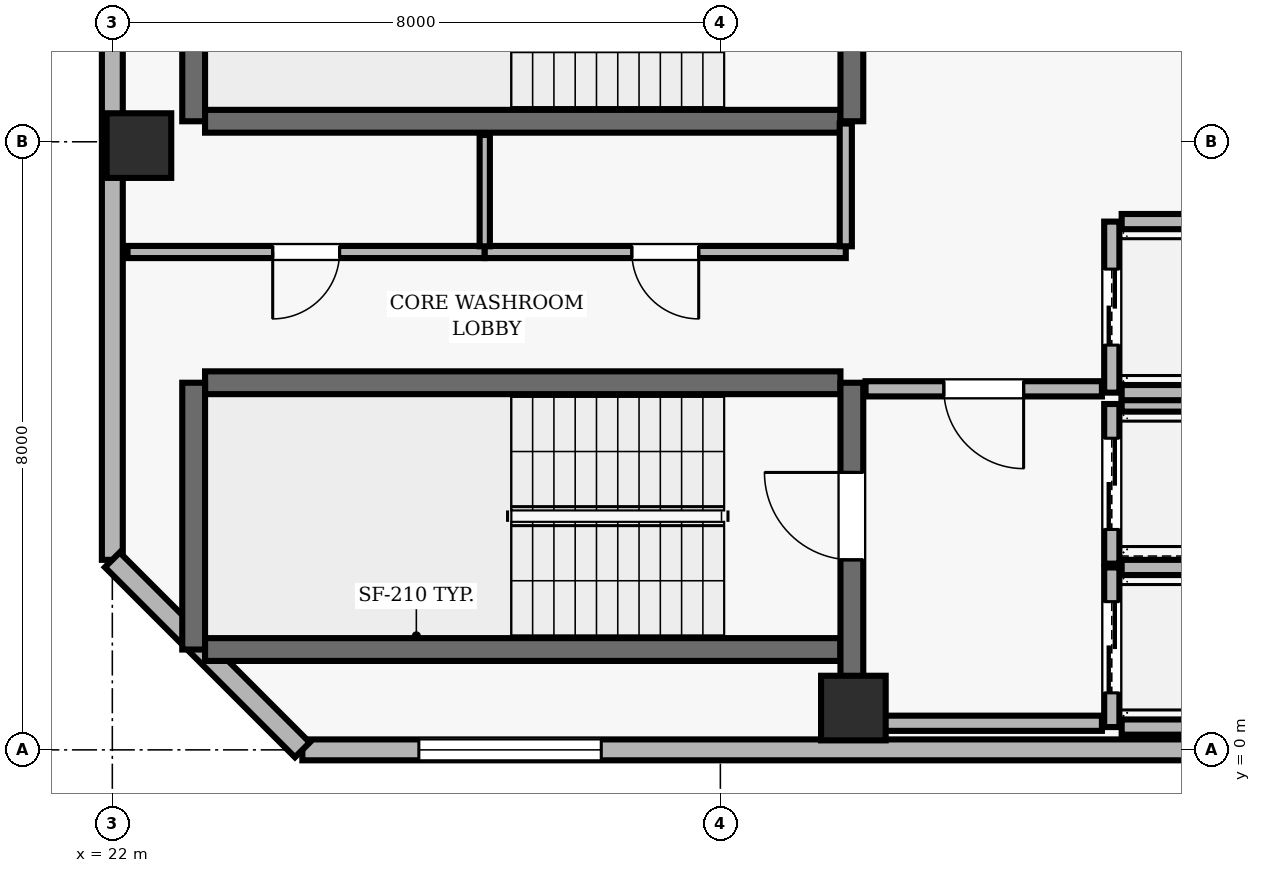
"""IFC4 building model, lengths in metres.
Left out: names, types, materials, properties, quantities, classifications, styles, units other than length and angle.
Written with IfcOpenShell. Run it as: python <this file> out.ifc"""

import sys

from ifc_helpers import new_model, si_unit, direction, frame, frame_2d, origin, origin_2d, place, context, subcontext, project, spatial, rectangle, extrude, element, fill, save


model = new_model("IFC4")
c1 = context("Model", 3, precision=1e-05, world=origin(), true_north=direction((0.0, 1.0)))
c2 = subcontext(c1, "Body", "Model", "MODEL_VIEW")
j1 = project(units=[si_unit("LENGTHUNIT", "METRE"), si_unit("PLANEANGLEUNIT", "RADIAN")], contexts=[c1])
p1 = place(None, origin())
s1 = spatial("IfcSite", under=j1, at=p1, CompositionType="ELEMENT")
p2 = place(p1, origin())
s2 = spatial("IfcBuilding", under=s1, at=p2, CompositionType="ELEMENT")
p3 = place(p2, frame((0.0, 0.0, 263.8)))
s3 = spatial("IfcBuildingStorey", under=s2, at=p3, CompositionType="ELEMENT", Elevation=263.8)
for number, where, z_axis, x_axis in (
    (1, (31.75, 0.55, 0.0), (0.0, 0.0, 1.0), (1.0, 0.0, 0.0)),
    (2, (22.35, 7.95, 0.0), (0.0, 0.0, 1.0), (1.0, 0.0, 0.0)),
):
    element("IfcColumn", number, at=place(p3, frame(where, z_axis=z_axis, x_axis=x_axis)), inside=s3, PredefinedType="COLUMN", context=c2, shape_type="SweptSolid", body=[
        extrude(rectangle(XDim=0.85, YDim=0.85, at=origin_2d()), origin(), (0.0, 0.0, 1.0), 3.9),
    ])
p4 = place(p3, frame((24.5, 0.0, 0.0), z_axis=(0.0, 0.0, 1.0), x_axis=(1.0, 0.0, 0.0)))
e3 = element("IfcWall", 3, at=p4, inside=s3, PredefinedType="SOLIDWALL", context=c2, shape_type="SweptSolid", body=[
    extrude(rectangle(XDim=32.8, YDim=0.275, at=frame_2d((16.4, 0.0))), origin(), (0.0, 0.0, 1.0), 3.69),
])
p5 = place(p4, frame((1.533, 0.0, 0.9)))
e4 = element("IfcOpeningElement", 4, at=p5, cuts=e3, PredefinedType="OPENING", context=c2, shape_type="SweptSolid", body=[
    extrude(rectangle(XDim=2.4, YDim=1.6, at=frame_2d((1.2, 0.8))), frame((0.0, 0.147, 0.0), z_axis=(0.0, -1.0, 0.0), x_axis=(1.0, 0.0, 0.0)), (0.0, 0.0, 1.0), 0.295),
])
p6 = place(p4, frame((23.4, 0.0, 0.9)))
e5 = element("IfcOpeningElement", 5, at=p6, cuts=e3, PredefinedType="OPENING", context=c2, shape_type="SweptSolid", body=[
    extrude(rectangle(XDim=2.4, YDim=1.6, at=frame_2d((1.2, 0.8))), frame((0.0, 0.147, 0.0), z_axis=(0.0, -1.0, 0.0), x_axis=(1.0, 0.0, 0.0)), (0.0, 0.0, 1.0), 0.295),
])
p7 = place(p4, frame((28.867, 0.0, 0.9)))
e6 = element("IfcOpeningElement", 6, at=p7, cuts=e3, PredefinedType="OPENING", context=c2, shape_type="SweptSolid", body=[
    extrude(rectangle(XDim=2.4, YDim=1.6, at=frame_2d((1.2, 0.8))), frame((0.0, 0.147, 0.0), z_axis=(0.0, -1.0, 0.0), x_axis=(1.0, 0.0, 0.0)), (0.0, 0.0, 1.0), 0.295),
])
p8 = place(p3, frame((22.0, 35.3, 0.0), z_axis=(0.0, 0.0, 1.0), x_axis=(0.0, -1.0, 0.0)))
e7 = element("IfcWall", 7, at=p8, inside=s3, PredefinedType="SOLIDWALL", context=c2, shape_type="SweptSolid", body=[
    extrude(rectangle(XDim=32.8, YDim=0.275, at=frame_2d((16.4, 0.0))), origin(), (0.0, 0.0, 1.0), 3.69),
])
p9 = place(p8, frame((7.3, 0.0, 0.0)))
e8 = element("IfcOpeningElement", 8, at=p9, cuts=e7, PredefinedType="OPENING", context=c2, shape_type="SweptSolid", body=[
    extrude(rectangle(XDim=1.0, YDim=2.2, at=frame_2d((0.5, 1.1))), frame((0.0, 0.147, 0.0), z_axis=(0.0, -1.0, 0.0), x_axis=(1.0, 0.0, 0.0)), (0.0, 0.0, 1.0), 0.295),
])
p10 = place(p8, frame((12.917, 0.0, 0.9)))
e9 = element("IfcOpeningElement", 9, at=p10, cuts=e7, PredefinedType="OPENING", context=c2, shape_type="SweptSolid", body=[
    extrude(rectangle(XDim=2.4, YDim=1.6, at=frame_2d((1.2, 0.8))), frame((0.0, 0.147, 0.0), z_axis=(0.0, -1.0, 0.0), x_axis=(1.0, 0.0, 0.0)), (0.0, 0.0, 1.0), 0.295),
])
p11 = place(p8, frame((17.483, 0.0, 0.9)))
e10 = element("IfcOpeningElement", 10, at=p11, cuts=e7, PredefinedType="OPENING", context=c2, shape_type="SweptSolid", body=[
    extrude(rectangle(XDim=2.4, YDim=1.6, at=frame_2d((1.2, 0.8))), frame((0.0, 0.147, 0.0), z_axis=(0.0, -1.0, 0.0), x_axis=(1.0, 0.0, 0.0)), (0.0, 0.0, 1.0), 0.295),
])
p12 = place(p8, frame((23.4, 0.0, 0.9)))
e11 = element("IfcOpeningElement", 11, at=p12, cuts=e7, PredefinedType="OPENING", context=c2, shape_type="SweptSolid", body=[
    extrude(rectangle(XDim=2.4, YDim=1.6, at=frame_2d((1.2, 0.8))), frame((0.0, 0.147, 0.0), z_axis=(0.0, -1.0, 0.0), x_axis=(1.0, 0.0, 0.0)), (0.0, 0.0, 1.0), 0.295),
])
p13 = place(p3, frame((22.0, 2.5, 0.0), z_axis=(0.0, 0.0, 1.0), x_axis=(0.707106781187, -0.707106781187, 0.0)))
e12 = element("IfcWall", 12, at=p13, inside=s3, PredefinedType="SOLIDWALL", context=c2, shape_type="SweptSolid", body=[
    extrude(rectangle(XDim=3.536, YDim=0.275, at=frame_2d((1.768, 0.0))), origin(), (0.0, 0.0, 1.0), 3.69),
])
p14 = place(p3, frame((31.58, 4.83, 0.0), z_axis=(0.0, 0.0, 1.0), x_axis=(-1.0, 0.0, 0.0)))
e13 = element("IfcWall", 13, at=p14, inside=s3, PredefinedType="SHEAR", context=c2, shape_type="SweptSolid", body=[
    extrude(rectangle(XDim=8.36, YDim=0.3, at=frame_2d((4.18, 0.0))), origin(), (0.0, 0.0, 1.0), 3.69),
])
p15 = place(p3, frame((23.07, 4.83, 0.0), z_axis=(0.0, 0.0, 1.0), x_axis=(0.0, -1.0, 0.0)))
e14 = element("IfcWall", 14, at=p15, inside=s3, PredefinedType="SHEAR", context=c2, shape_type="SweptSolid", body=[
    extrude(rectangle(XDim=3.51, YDim=0.3, at=frame_2d((1.755, 0.0))), origin(), (0.0, 0.0, 1.0), 3.69),
])
p16 = place(p3, frame((23.22, 1.32, 0.0), z_axis=(0.0, 0.0, 1.0), x_axis=(1.0, 0.0, 0.0)))
e15 = element("IfcWall", 15, at=p16, inside=s3, PredefinedType="SHEAR", context=c2, shape_type="SweptSolid", body=[
    extrude(rectangle(XDim=8.36, YDim=0.3, at=frame_2d((4.18, 0.0))), origin(), (0.0, 0.0, 1.0), 3.69),
])
p17 = place(p3, frame((31.73, 0.96, 0.0), z_axis=(0.0, 0.0, 1.0), x_axis=(0.0, 1.0, 0.0)))
e16 = element("IfcWall", 16, at=p17, inside=s3, PredefinedType="SHEAR", context=c2, shape_type="SweptSolid", body=[
    extrude(rectangle(XDim=3.87, YDim=0.3, at=frame_2d((1.935, 0.0))), origin(), (0.0, 0.0, 1.0), 3.69),
])
p18 = place(p17, frame((1.54, 0.0, 0.0)))
e17 = element("IfcOpeningElement", 17, at=p18, cuts=e16, PredefinedType="OPENING", context=c2, shape_type="SweptSolid", body=[
    extrude(rectangle(XDim=1.15, YDim=2.15, at=frame_2d((0.575, 1.075))), frame((0.0, 0.16, 0.0), z_axis=(0.0, -1.0, 0.0), x_axis=(1.0, 0.0, 0.0)), (0.0, 0.0, 1.0), 0.32),
])
p19 = place(p3, frame((23.07, 11.78, 0.0), z_axis=(0.0, 0.0, 1.0), x_axis=(0.0, -1.0, 0.0)))
e18 = element("IfcWall", 18, at=p19, inside=s3, PredefinedType="SHEAR", context=c2, shape_type="SweptSolid", body=[
    extrude(rectangle(XDim=3.51, YDim=0.3, at=frame_2d((1.755, 0.0))), origin(), (0.0, 0.0, 1.0), 3.69),
])
p20 = place(p3, frame((23.22, 8.27, 0.0), z_axis=(0.0, 0.0, 1.0), x_axis=(1.0, 0.0, 0.0)))
e19 = element("IfcWall", 19, at=p20, inside=s3, PredefinedType="SHEAR", context=c2, shape_type="SweptSolid", body=[
    extrude(rectangle(XDim=8.36, YDim=0.3, at=frame_2d((4.18, 0.0))), origin(), (0.0, 0.0, 1.0), 3.69),
])
p21 = place(p3, frame((31.73, 8.27, 0.0), z_axis=(0.0, 0.0, 1.0), x_axis=(0.0, 1.0, 0.0)))
e20 = element("IfcWall", 20, at=p21, inside=s3, PredefinedType="SHEAR", context=c2, shape_type="SweptSolid", body=[
    extrude(rectangle(XDim=3.51, YDim=0.3, at=frame_2d((1.755, 0.0))), origin(), (0.0, 0.0, 1.0), 3.69),
])
p22 = place(p21, frame((1.18, 0.0, 0.0)))
e21 = element("IfcOpeningElement", 21, at=p22, cuts=e20, PredefinedType="OPENING", context=c2, shape_type="SweptSolid", body=[
    extrude(rectangle(XDim=1.15, YDim=2.15, at=frame_2d((0.575, 1.075))), frame((0.0, 0.16, 0.0), z_axis=(0.0, -1.0, 0.0), x_axis=(1.0, 0.0, 0.0)), (0.0, 0.0, 1.0), 0.32),
])
p23 = place(p3, frame((35.15, 2.4, 0.0), z_axis=(0.0, 0.0, 1.0), x_axis=(0.0, -1.0, 0.0)))
e22 = element("IfcWall", 22, at=p23, inside=s3, PredefinedType="SOLIDWALL", context=c2, shape_type="SweptSolid", body=[
    extrude(rectangle(XDim=2.1, YDim=0.2, at=frame_2d((1.05, 0.0))), origin(), (0.0, 0.0, 1.0), 3.69),
])
p24 = place(p23, frame((0.45, 0.0, 0.0)))
e23 = element("IfcOpeningElement", 23, at=p24, cuts=e22, PredefinedType="OPENING", context=c2, shape_type="SweptSolid", body=[
    extrude(rectangle(XDim=1.2, YDim=2.15, at=frame_2d((0.6, 1.075))), frame((0.0, 0.11, 0.0), z_axis=(0.0, -1.0, 0.0), x_axis=(1.0, 0.0, 0.0)), (0.0, 0.0, 1.0), 0.22),
])
for number, where, z_axis, x_axis in (
    (24, (35.28, 0.3, 0.0), (0.0, 0.0, 1.0), (1.0, 0.0, 0.0)),
    (25, (37.42, 2.4, 0.0), (0.0, 0.0, 1.0), (-1.0, 0.0, 0.0)),
):
    element("IfcWall", number, at=place(p3, frame(where, z_axis=z_axis, x_axis=x_axis)), inside=s3, PredefinedType="SOLIDWALL", context=c2, shape_type="SweptSolid", body=[
        extrude(rectangle(XDim=2.14, YDim=0.2, at=frame_2d((1.07, 0.0))), origin(), (0.0, 0.0, 1.0), 3.69),
    ])
p25 = place(p3, frame((35.15, 4.55, 0.0), z_axis=(0.0, 0.0, 1.0), x_axis=(0.0, -1.0, 0.0)))
e26 = element("IfcWall", 26, at=p25, inside=s3, PredefinedType="SOLIDWALL", context=c2, shape_type="SweptSolid", body=[
    extrude(rectangle(XDim=2.1, YDim=0.2, at=frame_2d((1.05, 0.0))), origin(), (0.0, 0.0, 1.0), 3.69),
])
p26 = place(p25, frame((0.45, 0.0, 0.0)))
e27 = element("IfcOpeningElement", 27, at=p26, cuts=e26, PredefinedType="OPENING", context=c2, shape_type="SweptSolid", body=[
    extrude(rectangle(XDim=1.2, YDim=2.15, at=frame_2d((0.6, 1.075))), frame((0.0, 0.11, 0.0), z_axis=(0.0, -1.0, 0.0), x_axis=(1.0, 0.0, 0.0)), (0.0, 0.0, 1.0), 0.22),
])
p27 = place(p3, frame((37.42, 4.55, 0.0), z_axis=(0.0, 0.0, 1.0), x_axis=(-1.0, 0.0, 0.0)))
e28 = element("IfcWall", 28, at=p27, inside=s3, PredefinedType="SOLIDWALL", context=c2, shape_type="SweptSolid", body=[
    extrude(rectangle(XDim=2.14, YDim=0.2, at=frame_2d((1.07, 0.0))), origin(), (0.0, 0.0, 1.0), 3.69),
])
p28 = place(p3, frame((35.15, 6.95, 0.0), z_axis=(0.0, 0.0, 1.0), x_axis=(0.0, -1.0, 0.0)))
e29 = element("IfcWall", 29, at=p28, inside=s3, PredefinedType="SOLIDWALL", context=c2, shape_type="SweptSolid", body=[
    extrude(rectangle(XDim=2.25, YDim=0.2, at=frame_2d((1.125, 0.0))), origin(), (0.0, 0.0, 1.0), 3.69),
])
p29 = place(p28, frame((0.625, 0.0, 0.0)))
e30 = element("IfcOpeningElement", 30, at=p29, cuts=e29, PredefinedType="OPENING", context=c2, shape_type="SweptSolid", body=[
    extrude(rectangle(XDim=1.0, YDim=2.1, at=frame_2d((0.5, 1.05))), frame((0.0, 0.11, 0.0), z_axis=(0.0, -1.0, 0.0), x_axis=(1.0, 0.0, 0.0)), (0.0, 0.0, 1.0), 0.22),
])
for number, where, z_axis, x_axis in (
    (31, (35.28, 4.7, 0.0), (0.0, 0.0, 1.0), (1.0, 0.0, 0.0)),
    (32, (37.42, 6.95, 0.0), (0.0, 0.0, 1.0), (-1.0, 0.0, 0.0)),
):
    element("IfcWall", number, at=place(p3, frame(where, z_axis=z_axis, x_axis=x_axis)), inside=s3, PredefinedType="SOLIDWALL", context=c2, shape_type="SweptSolid", body=[
        extrude(rectangle(XDim=2.14, YDim=0.2, at=frame_2d((1.07, 0.0))), origin(), (0.0, 0.0, 1.0), 3.69),
    ])
p30 = place(p3, frame((26.9, 6.55, 0.0), z_axis=(0.0, 0.0, 1.0), x_axis=(-1.0, 0.0, 0.0)))
e33 = element("IfcWall", 33, at=p30, inside=s3, PredefinedType="PARTITIONING", context=c2, shape_type="SweptSolid", body=[
    extrude(rectangle(XDim=4.7, YDim=0.16, at=frame_2d((2.35, 0.0))), origin(), (0.0, 0.0, 1.0), 3.69),
])
p31 = place(p30, frame((1.91, 0.0, 0.0)))
e34 = element("IfcOpeningElement", 34, at=p31, cuts=e33, PredefinedType="OPENING", context=c2, shape_type="SweptSolid", body=[
    extrude(rectangle(XDim=0.88, YDim=2.1, at=frame_2d((0.44, 1.05))), frame((0.0, 0.09, 0.0), z_axis=(0.0, -1.0, 0.0), x_axis=(1.0, 0.0, 0.0)), (0.0, 0.0, 1.0), 0.18),
])
p32 = place(p3, frame((31.65, 0.35, 0.0), z_axis=(0.0, 0.0, 1.0), x_axis=(1.0, 0.0, 0.0)))
e35 = element("IfcWall", 35, at=p32, inside=s3, PredefinedType="SOLIDWALL", context=c2, shape_type="SweptSolid", body=[
    extrude(rectangle(XDim=3.37, YDim=0.2, at=frame_2d((1.685, 0.0))), origin(), (0.0, 0.0, 1.0), 3.69),
])
p33 = place(p3, frame((31.65, 6.55, 0.0), z_axis=(0.0, 0.0, 1.0), x_axis=(-1.0, 0.0, 0.0)))
e36 = element("IfcWall", 36, at=p33, inside=s3, PredefinedType="PARTITIONING", context=c2, shape_type="SweptSolid", body=[
    extrude(rectangle(XDim=4.75, YDim=0.16, at=frame_2d((2.375, 0.0))), origin(), (0.0, 0.0, 1.0), 3.69),
])
p34 = place(p33, frame((1.935, 0.0, 0.0)))
e37 = element("IfcOpeningElement", 37, at=p34, cuts=e36, PredefinedType="OPENING", context=c2, shape_type="SweptSolid", body=[
    extrude(rectangle(XDim=0.88, YDim=2.1, at=frame_2d((0.44, 1.05))), frame((0.0, 0.09, 0.0), z_axis=(0.0, -1.0, 0.0), x_axis=(1.0, 0.0, 0.0)), (0.0, 0.0, 1.0), 0.18),
])
p35 = place(p3, frame((35.02, 4.75, 0.0), z_axis=(0.0, 0.0, 1.0), x_axis=(-1.0, 0.0, 0.0)))
e38 = element("IfcWall", 38, at=p35, inside=s3, PredefinedType="SOLIDWALL", context=c2, shape_type="SweptSolid", body=[
    extrude(rectangle(XDim=3.11, YDim=0.2, at=frame_2d((1.555, 0.0))), origin(), (0.0, 0.0, 1.0), 3.69),
])
p36 = place(p35, frame((1.03, 0.0, 0.0)))
e39 = element("IfcOpeningElement", 39, at=p36, cuts=e38, PredefinedType="OPENING", context=c2, shape_type="SweptSolid", body=[
    extrude(rectangle(XDim=1.05, YDim=2.15, at=frame_2d((0.525, 1.075))), frame((0.0, 0.11, 0.0), z_axis=(0.0, -1.0, 0.0), x_axis=(1.0, 0.0, 0.0)), (0.0, 0.0, 1.0), 0.22),
])
p37 = place(p3, frame((26.9, 6.625, 0.0), z_axis=(0.0, 0.0, 1.0), x_axis=(0.0, 1.0, 0.0)))
e40 = element("IfcWall", 40, at=p37, inside=s3, PredefinedType="PARTITIONING", context=c2, shape_type="SweptSolid", body=[
    extrude(rectangle(XDim=1.465, YDim=0.135, at=frame_2d((0.732, 0.0))), origin(), (0.0, 0.0, 1.0), 3.69),
])
p38 = place(p3, frame((31.65, 8.24, 0.0), z_axis=(0.0, 0.0, 1.0), x_axis=(0.0, -1.0, 0.0)))
e41 = element("IfcWall", 41, at=p38, inside=s3, PredefinedType="PARTITIONING", context=c2, shape_type="SweptSolid", body=[
    extrude(rectangle(XDim=1.615, YDim=0.16, at=frame_2d((0.808, 0.0))), origin(), (0.0, 0.0, 1.0), 3.69),
])
p39 = place(p5, origin())
e42 = element("IfcWindow", 42, at=p39, inside=s3, PartitioningType="SINGLE_PANEL", PredefinedType="WINDOW", context=c2, shape_type="SweptSolid", body=[
    extrude(rectangle(XDim=2.4, YDim=1.6, at=frame_2d((1.2, 0.8))), frame((0.0, 0.03, 0.0), z_axis=(0.0, -1.0, 0.0), x_axis=(1.0, 0.0, 0.0)), (0.0, 0.0, 1.0), 0.06),
])
fill(e4, e42)
p40 = place(p18, origin())
e43 = element("IfcDoor", 43, at=p40, inside=s3, OperationType="SINGLE_SWING_RIGHT", PredefinedType="DOOR", context=c2, shape_type="SweptSolid", body=[
    extrude(rectangle(XDim=1.15, YDim=2.15, at=frame_2d((0.575, 1.075))), frame((0.0, 0.025, 0.0), z_axis=(0.0, -1.0, 0.0), x_axis=(1.0, 0.0, 0.0)), (0.0, 0.0, 1.0), 0.05),
])
fill(e17, e43)
p41 = place(p24, origin())
e44 = element("IfcDoor", 44, at=p41, inside=s3, OperationType="DOUBLE_DOOR_SLIDING", PredefinedType="DOOR", context=c2, shape_type="SweptSolid", body=[
    extrude(rectangle(XDim=1.2, YDim=2.15, at=frame_2d((0.6, 1.075))), frame((0.0, 0.025, 0.0), z_axis=(0.0, -1.0, 0.0), x_axis=(1.0, 0.0, 0.0)), (0.0, 0.0, 1.0), 0.05),
])
fill(e23, e44)
p42 = place(p26, origin())
e45 = element("IfcDoor", 45, at=p42, inside=s3, OperationType="DOUBLE_DOOR_SLIDING", PredefinedType="DOOR", context=c2, shape_type="SweptSolid", body=[
    extrude(rectangle(XDim=1.2, YDim=2.15, at=frame_2d((0.6, 1.075))), frame((0.0, 0.025, 0.0), z_axis=(0.0, -1.0, 0.0), x_axis=(1.0, 0.0, 0.0)), (0.0, 0.0, 1.0), 0.05),
])
fill(e27, e45)
p43 = place(p29, origin())
e46 = element("IfcDoor", 46, at=p43, inside=s3, OperationType="DOUBLE_DOOR_SLIDING", PredefinedType="DOOR", context=c2, shape_type="SweptSolid", body=[
    extrude(rectangle(XDim=1.0, YDim=2.1, at=frame_2d((0.5, 1.05))), frame((0.0, 0.025, 0.0), z_axis=(0.0, -1.0, 0.0), x_axis=(1.0, 0.0, 0.0)), (0.0, 0.0, 1.0), 0.05),
])
fill(e30, e46)
p44 = place(p36, origin())
e47 = element("IfcDoor", 47, at=p44, inside=s3, OperationType="SINGLE_SWING_LEFT", PredefinedType="DOOR", context=c2, shape_type="SweptSolid", body=[
    extrude(rectangle(XDim=1.05, YDim=2.15, at=frame_2d((0.525, 1.075))), frame((0.0, 0.025, 0.0), z_axis=(0.0, -1.0, 0.0), x_axis=(1.0, 0.0, 0.0)), (0.0, 0.0, 1.0), 0.05),
])
fill(e39, e47)
p45 = place(p31, origin())
e48 = element("IfcDoor", 48, at=p45, inside=s3, OperationType="SINGLE_SWING_RIGHT", PredefinedType="DOOR", context=c2, shape_type="SweptSolid", body=[
    extrude(rectangle(XDim=0.88, YDim=2.1, at=frame_2d((0.44, 1.05))), frame((0.0, 0.025, 0.0), z_axis=(0.0, -1.0, 0.0), x_axis=(1.0, 0.0, 0.0)), (0.0, 0.0, 1.0), 0.05),
])
fill(e34, e48)
p46 = place(p34, origin())
e49 = element("IfcDoor", 49, at=p46, inside=s3, OperationType="SINGLE_SWING_LEFT", PredefinedType="DOOR", context=c2, shape_type="SweptSolid", body=[
    extrude(rectangle(XDim=0.88, YDim=2.1, at=frame_2d((0.44, 1.05))), frame((0.0, 0.025, 0.0), z_axis=(0.0, -1.0, 0.0), x_axis=(1.0, 0.0, 0.0)), (0.0, 0.0, 1.0), 0.05),
])
fill(e37, e49)
save(model, sys.argv[1])
